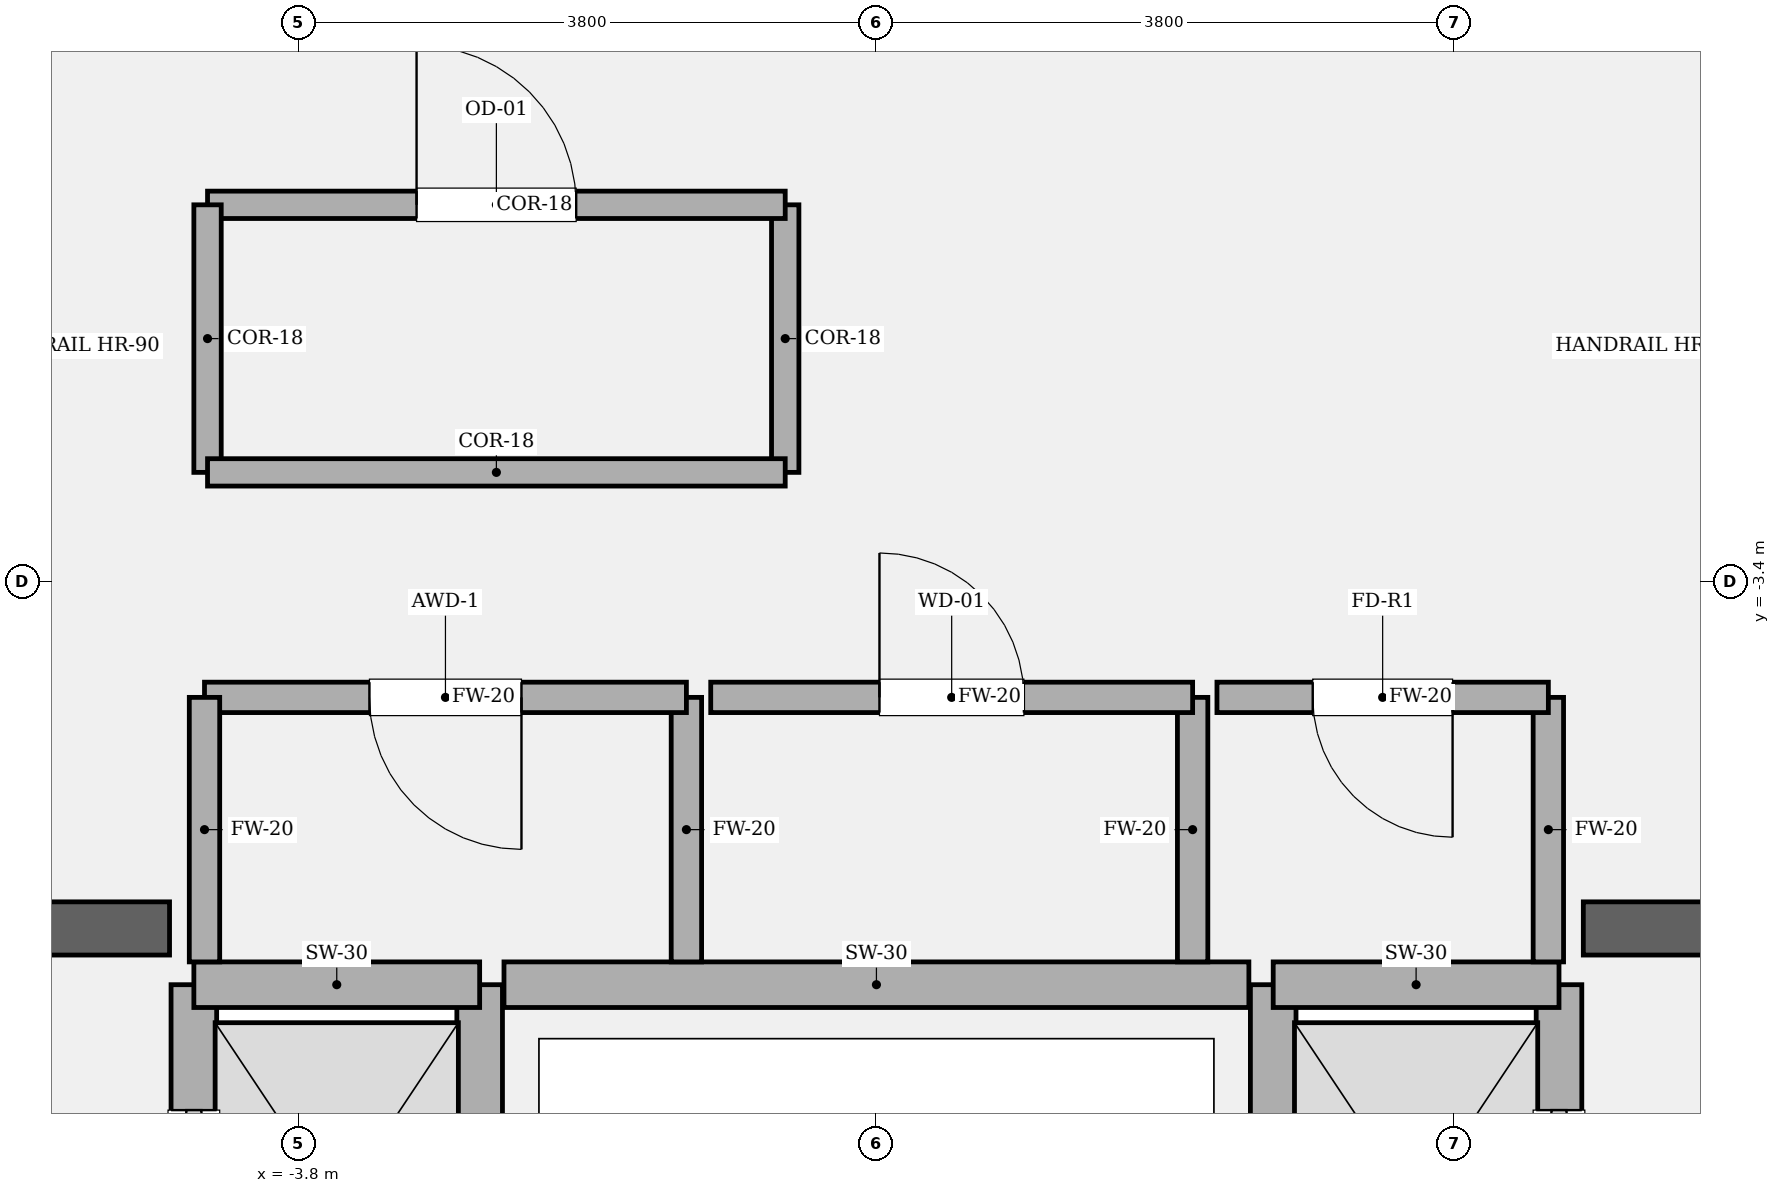
"""IFC4 building model, lengths in metres.
Left out: names, types, materials, properties, quantities, classifications, styles, units other than length and angle.
Written with IfcOpenShell. Run it as: python <this file> out.ifc"""

import sys

from ifc_helpers import new_model, si_unit, direction, frame, frame_2d, origin, place, context, subcontext, project, spatial, rectangle, extrude, element, fill, save


model = new_model("IFC4")
c1 = context("Model", 3, precision=1e-05, world=origin(), true_north=direction((0.0, 1.0)))
c2 = subcontext(c1, "Body", "Model", "MODEL_VIEW")
j1 = project(units=[si_unit("LENGTHUNIT", "METRE"), si_unit("PLANEANGLEUNIT", "RADIAN")], contexts=[c1])
p1 = place(None, origin())
s1 = spatial("IfcSite", under=j1, at=p1, CompositionType="ELEMENT")
p2 = place(p1, origin())
s2 = spatial("IfcBuilding", under=s1, at=p2, CompositionType="ELEMENT")
p3 = place(p2, frame((0.0, 0.0, 232.95)))
s3 = spatial("IfcBuildingStorey", under=s2, at=p3, CompositionType="ELEMENT", Elevation=232.95)
p4 = place(p3, frame((-9.875, -5.68, 0.0), z_axis=(0.0, 0.0, 1.0), x_axis=(1.0, 0.0, 0.0)))
e1 = element("IfcWall", 1, at=p4, inside=s3, PredefinedType="SOLIDWALL", context=c2, shape_type="SweptSolid", body=[
    extrude(rectangle(XDim=5.225, YDim=0.35, at=frame_2d((2.613, 0.0))), origin(), (0.0, 0.0, 1.0), 4.05),
])
p5 = place(p4, frame((1.335, 0.0, 0.0)))
e2 = element("IfcOpeningElement", 2, at=p5, cuts=e1, PredefinedType="OPENING", context=c2, shape_type="SweptSolid", body=[
    extrude(rectangle(XDim=1.18, YDim=2.2, at=frame_2d((0.59, 1.1))), frame((0.0, 0.185, 0.0), z_axis=(0.0, -1.0, 0.0), x_axis=(1.0, 0.0, 0.0)), (0.0, 0.0, 1.0), 0.37),
])
p6 = place(p3, frame((4.65, -5.68, 0.0), z_axis=(0.0, 0.0, 1.0), x_axis=(1.0, 0.0, 0.0)))
e3 = element("IfcWall", 3, at=p6, inside=s3, PredefinedType="SOLIDWALL", context=c2, shape_type="SweptSolid", body=[
    extrude(rectangle(XDim=5.225, YDim=0.35, at=frame_2d((2.613, 0.0))), origin(), (0.0, 0.0, 1.0), 4.05),
])
p7 = place(p6, frame((2.71, 0.0, 0.0)))
e4 = element("IfcOpeningElement", 4, at=p7, cuts=e3, PredefinedType="OPENING", context=c2, shape_type="SweptSolid", body=[
    extrude(rectangle(XDim=1.18, YDim=2.2, at=frame_2d((0.59, 1.1))), frame((0.0, 0.185, 0.0), z_axis=(0.0, -1.0, 0.0), x_axis=(1.0, 0.0, 0.0)), (0.0, 0.0, 1.0), 0.37),
])
p8 = place(p3, frame((-4.49, -8.82, 0.0), z_axis=(0.0, 0.0, 1.0), x_axis=(0.0, 1.0, 0.0)))
e5 = element("IfcWall", 5, at=p8, inside=s3, PredefinedType="SOLIDWALL", context=c2, shape_type="SweptSolid", body=[
    extrude(rectangle(XDim=2.77, YDim=0.3, at=frame_2d((1.385, 0.0))), origin(), (0.0, 0.0, 1.0), 3.73),
])
p9 = place(p8, frame((0.825, 0.0, 0.0)))
e6 = element("IfcOpeningElement", 6, at=p9, cuts=e5, PredefinedType="OPENING", context=c2, shape_type="SweptSolid", body=[
    extrude(rectangle(XDim=1.12, YDim=2.25, at=frame_2d((0.56, 1.125))), frame((0.0, 0.16, 0.0), z_axis=(0.0, -1.0, 0.0), x_axis=(1.0, 0.0, 0.0)), (0.0, 0.0, 1.0), 0.32),
])
p10 = place(p3, frame((-2.61, -8.82, 0.0), z_axis=(0.0, 0.0, 1.0), x_axis=(0.0, 1.0, 0.0)))
e7 = element("IfcWall", 7, at=p10, inside=s3, PredefinedType="SOLIDWALL", context=c2, shape_type="SweptSolid", body=[
    extrude(rectangle(XDim=2.77, YDim=0.3, at=frame_2d((1.385, 0.0))), origin(), (0.0, 0.0, 1.0), 3.73),
])
p11 = place(p3, frame((-4.49, -6.05, 0.0), z_axis=(0.0, 0.0, 1.0), x_axis=(1.0, 0.0, 0.0)))
e8 = element("IfcWall", 8, at=p11, inside=s3, PredefinedType="SOLIDWALL", context=c2, shape_type="SweptSolid", body=[
    extrude(rectangle(XDim=1.88, YDim=0.3, at=frame_2d((0.94, 0.0))), origin(), (0.0, 0.0, 1.0), 3.73),
])
p12 = place(p3, frame((4.49, -8.82, 0.0), z_axis=(0.0, 0.0, 1.0), x_axis=(0.0, 1.0, 0.0)))
e9 = element("IfcWall", 9, at=p12, inside=s3, PredefinedType="SOLIDWALL", context=c2, shape_type="SweptSolid", body=[
    extrude(rectangle(XDim=2.77, YDim=0.3, at=frame_2d((1.385, 0.0))), origin(), (0.0, 0.0, 1.0), 3.73),
])
p13 = place(p12, frame((0.825, 0.0, 0.0)))
e10 = element("IfcOpeningElement", 10, at=p13, cuts=e9, PredefinedType="OPENING", context=c2, shape_type="SweptSolid", body=[
    extrude(rectangle(XDim=1.12, YDim=2.25, at=frame_2d((0.56, 1.125))), frame((0.0, 0.16, 0.0), z_axis=(0.0, -1.0, 0.0), x_axis=(1.0, 0.0, 0.0)), (0.0, 0.0, 1.0), 0.32),
])
p14 = place(p3, frame((2.61, -8.82, 0.0), z_axis=(0.0, 0.0, 1.0), x_axis=(0.0, 1.0, 0.0)))
e11 = element("IfcWall", 11, at=p14, inside=s3, PredefinedType="SOLIDWALL", context=c2, shape_type="SweptSolid", body=[
    extrude(rectangle(XDim=2.77, YDim=0.3, at=frame_2d((1.385, 0.0))), origin(), (0.0, 0.0, 1.0), 3.73),
])
p15 = place(p3, frame((2.61, -6.05, 0.0), z_axis=(0.0, 0.0, 1.0), x_axis=(1.0, 0.0, 0.0)))
e12 = element("IfcWall", 12, at=p15, inside=s3, PredefinedType="SOLIDWALL", context=c2, shape_type="SweptSolid", body=[
    extrude(rectangle(XDim=1.88, YDim=0.3, at=frame_2d((0.94, 0.0))), origin(), (0.0, 0.0, 1.0), 3.73),
])
p16 = place(p3, frame((-2.45, -6.05, 0.0), z_axis=(0.0, 0.0, 1.0), x_axis=(1.0, 0.0, 0.0)))
e13 = element("IfcWall", 13, at=p16, inside=s3, PredefinedType="SOLIDWALL", context=c2, shape_type="SweptSolid", body=[
    extrude(rectangle(XDim=4.9, YDim=0.3, at=frame_2d((2.45, 0.0))), origin(), (0.0, 0.0, 1.0), 3.73),
])
p17 = place(p3, frame((-1.25, -5.9, 0.0), z_axis=(0.0, 0.0, 1.0), x_axis=(0.0, 1.0, 0.0)))
e14 = element("IfcWall", 14, at=p17, inside=s3, PredefinedType="SOLIDWALL", context=c2, shape_type="SweptSolid", body=[
    extrude(rectangle(XDim=1.74, YDim=0.2, at=frame_2d((0.87, 0.0))), origin(), (0.0, 0.0, 1.0), 3.73),
])
p18 = place(p3, frame((-1.25, -4.16, 0.0), z_axis=(0.0, 0.0, 1.0), x_axis=(-1.0, 0.0, 0.0)))
e15 = element("IfcWall", 15, at=p18, inside=s3, PredefinedType="SOLIDWALL", context=c2, shape_type="SweptSolid", body=[
    extrude(rectangle(XDim=3.17, YDim=0.2, at=frame_2d((1.585, 0.0))), origin(), (0.0, 0.0, 1.0), 3.73),
])
p19 = place(p18, frame((1.085, 0.0, 0.0)))
e16 = element("IfcOpeningElement", 16, at=p19, cuts=e15, PredefinedType="OPENING", context=c2, shape_type="SweptSolid", body=[
    extrude(rectangle(XDim=1.0, YDim=2.15, at=frame_2d((0.5, 1.075))), frame((0.0, 0.11, 0.0), z_axis=(0.0, -1.0, 0.0), x_axis=(1.0, 0.0, 0.0)), (0.0, 0.0, 1.0), 0.22),
])
for number, where, z_axis, x_axis in (
    (17, (-4.42, -4.16, 0.0), (0.0, 0.0, 1.0), (0.0, -1.0, 0.0)),
    (18, (2.08, -5.9, 0.0), (0.0, 0.0, 1.0), (0.0, 1.0, 0.0)),
):
    element("IfcWall", number, at=place(p3, frame(where, z_axis=z_axis, x_axis=x_axis)), inside=s3, PredefinedType="SOLIDWALL", context=c2, shape_type="SweptSolid", body=[
        extrude(rectangle(XDim=1.74, YDim=0.2, at=frame_2d((0.87, 0.0))), origin(), (0.0, 0.0, 1.0), 3.73),
    ])
p20 = place(p3, frame((2.08, -4.16, 0.0), z_axis=(0.0, 0.0, 1.0), x_axis=(-1.0, 0.0, 0.0)))
e19 = element("IfcWall", 19, at=p20, inside=s3, PredefinedType="SOLIDWALL", context=c2, shape_type="SweptSolid", body=[
    extrude(rectangle(XDim=3.17, YDim=0.2, at=frame_2d((1.585, 0.0))), origin(), (0.0, 0.0, 1.0), 3.73),
])
p21 = place(p20, frame((1.11, 0.0, 0.0)))
e20 = element("IfcOpeningElement", 20, at=p21, cuts=e19, PredefinedType="OPENING", context=c2, shape_type="SweptSolid", body=[
    extrude(rectangle(XDim=0.95, YDim=2.15, at=frame_2d((0.475, 1.075))), frame((0.0, 0.11, 0.0), z_axis=(0.0, -1.0, 0.0), x_axis=(1.0, 0.0, 0.0)), (0.0, 0.0, 1.0), 0.22),
])
p22 = place(p3, frame((4.42, -5.9, 0.0), z_axis=(0.0, 0.0, 1.0), x_axis=(0.0, 1.0, 0.0)))
e21 = element("IfcWall", 21, at=p22, inside=s3, PredefinedType="SOLIDWALL", context=c2, shape_type="SweptSolid", body=[
    extrude(rectangle(XDim=1.74, YDim=0.2, at=frame_2d((0.87, 0.0))), origin(), (0.0, 0.0, 1.0), 3.73),
])
p23 = place(p3, frame((4.42, -4.16, 0.0), z_axis=(0.0, 0.0, 1.0), x_axis=(-1.0, 0.0, 0.0)))
e22 = element("IfcWall", 22, at=p23, inside=s3, PredefinedType="SOLIDWALL", context=c2, shape_type="SweptSolid", body=[
    extrude(rectangle(XDim=2.18, YDim=0.2, at=frame_2d((1.09, 0.0))), origin(), (0.0, 0.0, 1.0), 3.73),
])
p24 = place(p23, frame((0.63, 0.0, 0.0)))
e23 = element("IfcOpeningElement", 23, at=p24, cuts=e22, PredefinedType="OPENING", context=c2, shape_type="SweptSolid", body=[
    extrude(rectangle(XDim=0.92, YDim=2.1, at=frame_2d((0.46, 1.05))), frame((0.0, 0.11, 0.0), z_axis=(0.0, -1.0, 0.0), x_axis=(1.0, 0.0, 0.0)), (0.0, 0.0, 1.0), 0.22),
])
p25 = place(p3, frame((-0.6, -2.68, 0.0), z_axis=(0.0, 0.0, 1.0), x_axis=(0.0, 1.0, 0.0)))
e24 = element("IfcWall", 24, at=p25, inside=s3, PredefinedType="PARTITIONING", context=c2, shape_type="SweptSolid", body=[
    extrude(rectangle(XDim=1.76, YDim=0.18, at=frame_2d((0.88, 0.0))), origin(), (0.0, 0.0, 1.0), 3.73),
])
p26 = place(p3, frame((-0.6, -0.92, 0.0), z_axis=(0.0, 0.0, 1.0), x_axis=(-1.0, 0.0, 0.0)))
e25 = element("IfcWall", 25, at=p26, inside=s3, PredefinedType="PARTITIONING", context=c2, shape_type="SweptSolid", body=[
    extrude(rectangle(XDim=3.8, YDim=0.18, at=frame_2d((1.9, 0.0))), origin(), (0.0, 0.0, 1.0), 3.73),
])
p27 = place(p26, frame((1.375, 0.0, 0.0)))
e26 = element("IfcOpeningElement", 26, at=p27, cuts=e25, PredefinedType="OPENING", context=c2, shape_type="SweptSolid", body=[
    extrude(rectangle(XDim=1.05, YDim=2.2, at=frame_2d((0.525, 1.1))), frame((0.0, 0.1, 0.0), z_axis=(0.0, -1.0, 0.0), x_axis=(1.0, 0.0, 0.0)), (0.0, 0.0, 1.0), 0.2),
])
p28 = place(p3, frame((-4.4, -0.92, 0.0), z_axis=(0.0, 0.0, 1.0), x_axis=(0.0, -1.0, 0.0)))
e27 = element("IfcWall", 27, at=p28, inside=s3, PredefinedType="PARTITIONING", context=c2, shape_type="SweptSolid", body=[
    extrude(rectangle(XDim=1.76, YDim=0.18, at=frame_2d((0.88, 0.0))), origin(), (0.0, 0.0, 1.0), 3.73),
])
p29 = place(p3, frame((-4.4, -2.68, 0.0), z_axis=(0.0, 0.0, 1.0), x_axis=(1.0, 0.0, 0.0)))
e28 = element("IfcWall", 28, at=p29, inside=s3, PredefinedType="PARTITIONING", context=c2, shape_type="SweptSolid", body=[
    extrude(rectangle(XDim=3.8, YDim=0.18, at=frame_2d((1.9, 0.0))), origin(), (0.0, 0.0, 1.0), 3.73),
])
p30 = place(p9, origin())
e29 = element("IfcDoor", 29, at=p30, inside=s3, OperationType="SLIDING_TO_LEFT", PredefinedType="DOOR", context=c2, shape_type="SweptSolid", body=[
    extrude(rectangle(XDim=1.12, YDim=2.25, at=frame_2d((0.56, 1.125))), frame((0.0, 0.025, 0.0), z_axis=(0.0, -1.0, 0.0), x_axis=(1.0, 0.0, 0.0)), (0.0, 0.0, 1.0), 0.05),
])
fill(e6, e29)
p31 = place(p13, origin())
e30 = element("IfcDoor", 30, at=p31, inside=s3, OperationType="SLIDING_TO_RIGHT", PredefinedType="DOOR", context=c2, shape_type="SweptSolid", body=[
    extrude(rectangle(XDim=1.12, YDim=2.25, at=frame_2d((0.56, 1.125))), frame((0.0, 0.025, 0.0), z_axis=(0.0, -1.0, 0.0), x_axis=(1.0, 0.0, 0.0)), (0.0, 0.0, 1.0), 0.05),
])
fill(e10, e30)
p32 = place(p19, origin())
e31 = element("IfcDoor", 31, at=p32, inside=s3, OperationType="SINGLE_SWING_LEFT", PredefinedType="DOOR", context=c2, shape_type="SweptSolid", body=[
    extrude(rectangle(XDim=1.0, YDim=2.15, at=frame_2d((0.5, 1.075))), frame((0.0, 0.025, 0.0), z_axis=(0.0, -1.0, 0.0), x_axis=(1.0, 0.0, 0.0)), (0.0, 0.0, 1.0), 0.05),
])
fill(e16, e31)
p33 = place(p21, origin())
e32 = element("IfcDoor", 32, at=p33, inside=s3, OperationType="SINGLE_SWING_RIGHT", PredefinedType="DOOR", context=c2, shape_type="SweptSolid", body=[
    extrude(rectangle(XDim=0.95, YDim=2.15, at=frame_2d((0.475, 1.075))), frame((0.0, 0.025, 0.0), z_axis=(0.0, -1.0, 0.0), x_axis=(1.0, 0.0, 0.0)), (0.0, 0.0, 1.0), 0.05),
])
fill(e20, e32)
p34 = place(p24, origin())
e33 = element("IfcDoor", 33, at=p34, inside=s3, OperationType="SINGLE_SWING_LEFT", PredefinedType="DOOR", context=c2, shape_type="SweptSolid", body=[
    extrude(rectangle(XDim=0.92, YDim=2.1, at=frame_2d((0.46, 1.05))), frame((0.0, 0.025, 0.0), z_axis=(0.0, -1.0, 0.0), x_axis=(1.0, 0.0, 0.0)), (0.0, 0.0, 1.0), 0.05),
])
fill(e23, e33)
p35 = place(p27, origin())
e34 = element("IfcDoor", 34, at=p35, inside=s3, OperationType="SINGLE_SWING_RIGHT", PredefinedType="DOOR", context=c2, shape_type="SweptSolid", body=[
    extrude(rectangle(XDim=1.05, YDim=2.2, at=frame_2d((0.525, 1.1))), frame((0.0, 0.025, 0.0), z_axis=(0.0, -1.0, 0.0), x_axis=(1.0, 0.0, 0.0)), (0.0, 0.0, 1.0), 0.05),
])
fill(e26, e34)
save(model, sys.argv[1])
